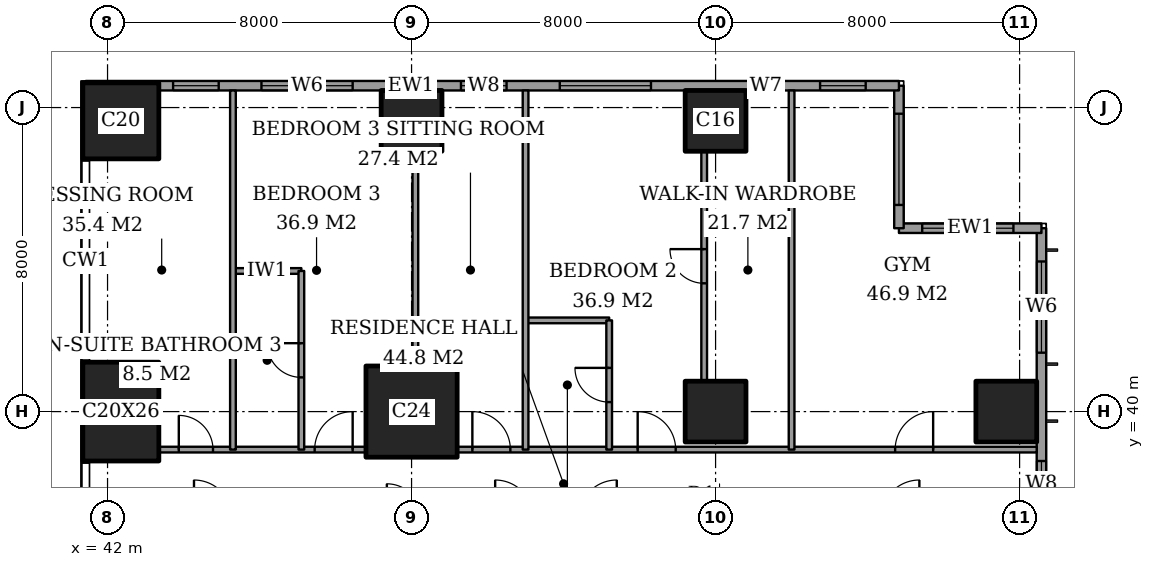
"""IFC4 building model, lengths in metres.
Left out: names, types, materials, properties, quantities, classifications, styles, units other than length and angle.
Written with IfcOpenShell. Run it as: python <this file> out.ifc"""

import sys

from ifc_helpers import new_model, si_unit, direction, frame, frame_2d, origin, origin_2d, place, context, subcontext, project, spatial, rectangle, extrude, element, fill, save


model = new_model("IFC4")
c1 = context("Model", 3, precision=1e-05, world=origin(), true_north=direction((0.0, 1.0)))
c2 = subcontext(c1, "Body", "Model", "MODEL_VIEW")
j1 = project(units=[si_unit("LENGTHUNIT", "METRE"), si_unit("PLANEANGLEUNIT", "RADIAN")], contexts=[c1])
p1 = place(None, origin())
s1 = spatial("IfcSite", under=j1, at=p1, CompositionType="ELEMENT")
p2 = place(p1, origin())
s2 = spatial("IfcBuilding", under=s1, at=p2, CompositionType="ELEMENT")
p3 = place(p2, frame((0.0, 0.0, 266.4)))
s3 = spatial("IfcBuildingStorey", under=s2, at=p3, CompositionType="ELEMENT", Elevation=266.4)
p4 = place(p3, frame((42.35, 40.0, 0.0), z_axis=(0.0, 0.0, 1.0), x_axis=(1.0, 0.0, 0.0)))
e1 = element("IfcColumn", 1, at=p4, inside=s3, PredefinedType="COLUMN", context=c2, shape_type="SweptSolid", body=[
    extrude(rectangle(XDim=2.0, YDim=2.6, at=origin_2d()), origin(), (0.0, 0.0, 1.0), 3.6),
])
p5 = place(p3, frame((42.35, 47.65, 0.0), z_axis=(0.0, 0.0, 1.0), x_axis=(1.0, 0.0, 0.0)))
e2 = element("IfcColumn", 2, at=p5, inside=s3, PredefinedType="COLUMN", context=c2, shape_type="SweptSolid", body=[
    extrude(rectangle(XDim=2.0, YDim=2.0, at=origin_2d()), origin(), (0.0, 0.0, 1.0), 3.6),
])
p6 = place(p3, frame((50.0, 40.0, 0.0), z_axis=(0.0, 0.0, 1.0), x_axis=(1.0, 0.0, 0.0)))
e3 = element("IfcColumn", 3, at=p6, inside=s3, PredefinedType="COLUMN", context=c2, shape_type="SweptSolid", body=[
    extrude(rectangle(XDim=2.4, YDim=2.4, at=origin_2d()), origin(), (0.0, 0.0, 1.0), 3.6),
])
for number, where, z_axis, x_axis in (
    (4, (50.0, 47.65, 0.0), (0.0, 0.0, 1.0), (1.0, 0.0, 0.0)),
    (5, (58.0, 40.0, 0.0), (0.0, 0.0, 1.0), (1.0, 0.0, 0.0)),
    (6, (58.0, 47.65, 0.0), (0.0, 0.0, 1.0), (1.0, 0.0, 0.0)),
    (7, (65.65, 40.0, 0.0), (0.0, 0.0, 1.0), (1.0, 0.0, 0.0)),
):
    element("IfcColumn", number, at=place(p3, frame(where, z_axis=z_axis, x_axis=x_axis)), inside=s3, PredefinedType="COLUMN", context=c2, shape_type="SweptSolid", body=[
        extrude(rectangle(XDim=1.6, YDim=1.6, at=origin_2d()), origin(), (0.0, 0.0, 1.0), 3.6),
    ])
p7 = place(p3, frame((66.575, 3.175, 0.0), z_axis=(0.0, 0.0, 1.0), x_axis=(0.0, 1.0, 0.0)))
e8 = element("IfcWall", 8, at=p7, inside=s3, PredefinedType="SOLIDWALL", context=c2, shape_type="SweptSolid", body=[
    extrude(rectangle(XDim=41.65, YDim=0.25, at=frame_2d((20.825, 0.0))), origin(), (0.0, 0.0, 1.0), 3.6),
])
p8 = place(p7, frame((0.875, 0.0, 0.6)))
e9 = element("IfcOpeningElement", 9, at=p8, cuts=e8, PredefinedType="OPENING", context=c2, shape_type="SweptSolid", body=[
    extrude(rectangle(XDim=2.4, YDim=2.0, at=frame_2d((1.2, 1.0))), frame((0.0, 0.135, 0.0), z_axis=(0.0, -1.0, 0.0), x_axis=(1.0, 0.0, 0.0)), (0.0, 0.0, 1.0), 0.27),
])
p9 = place(p7, frame((6.0, 0.0, 0.6)))
e10 = element("IfcOpeningElement", 10, at=p9, cuts=e8, PredefinedType="OPENING", context=c2, shape_type="SweptSolid", body=[
    extrude(rectangle(XDim=1.2, YDim=2.0, at=frame_2d((0.6, 1.0))), frame((0.0, 0.135, 0.0), z_axis=(0.0, -1.0, 0.0), x_axis=(1.0, 0.0, 0.0)), (0.0, 0.0, 1.0), 0.27),
])
p10 = place(p7, frame((8.525, 0.0, 0.6)))
e11 = element("IfcOpeningElement", 11, at=p10, cuts=e8, PredefinedType="OPENING", context=c2, shape_type="SweptSolid", body=[
    extrude(rectangle(XDim=2.4, YDim=2.0, at=frame_2d((1.2, 1.0))), frame((0.0, 0.135, 0.0), z_axis=(0.0, -1.0, 0.0), x_axis=(1.0, 0.0, 0.0)), (0.0, 0.0, 1.0), 0.27),
])
p11 = place(p7, frame((15.625, 0.0, 0.6)))
e12 = element("IfcOpeningElement", 12, at=p11, cuts=e8, PredefinedType="OPENING", context=c2, shape_type="SweptSolid", body=[
    extrude(rectangle(XDim=2.4, YDim=2.0, at=frame_2d((1.2, 1.0))), frame((0.0, 0.135, 0.0), z_axis=(0.0, -1.0, 0.0), x_axis=(1.0, 0.0, 0.0)), (0.0, 0.0, 1.0), 0.27),
])
p12 = place(p7, frame((23.525, 0.0, 0.6)))
e13 = element("IfcOpeningElement", 13, at=p12, cuts=e8, PredefinedType="OPENING", context=c2, shape_type="SweptSolid", body=[
    extrude(rectangle(XDim=2.4, YDim=2.0, at=frame_2d((1.2, 1.0))), frame((0.0, 0.135, 0.0), z_axis=(0.0, -1.0, 0.0), x_axis=(1.0, 0.0, 0.0)), (0.0, 0.0, 1.0), 0.27),
])
p13 = place(p7, frame((30.625, 0.0, 0.6)))
e14 = element("IfcOpeningElement", 14, at=p13, cuts=e8, PredefinedType="OPENING", context=c2, shape_type="SweptSolid", body=[
    extrude(rectangle(XDim=2.4, YDim=2.0, at=frame_2d((1.2, 1.0))), frame((0.0, 0.135, 0.0), z_axis=(0.0, -1.0, 0.0), x_axis=(1.0, 0.0, 0.0)), (0.0, 0.0, 1.0), 0.27),
])
p14 = place(p7, frame((34.325, 0.0, 0.6)))
e15 = element("IfcOpeningElement", 15, at=p14, cuts=e8, PredefinedType="OPENING", context=c2, shape_type="SweptSolid", body=[
    extrude(rectangle(XDim=1.2, YDim=2.0, at=frame_2d((0.6, 1.0))), frame((0.0, 0.135, 0.0), z_axis=(0.0, -1.0, 0.0), x_axis=(1.0, 0.0, 0.0)), (0.0, 0.0, 1.0), 0.27),
])
p15 = place(p7, frame((38.375, 0.0, 0.6)))
e16 = element("IfcOpeningElement", 16, at=p15, cuts=e8, PredefinedType="OPENING", context=c2, shape_type="SweptSolid", body=[
    extrude(rectangle(XDim=2.4, YDim=2.0, at=frame_2d((1.2, 1.0))), frame((0.0, 0.135, 0.0), z_axis=(0.0, -1.0, 0.0), x_axis=(1.0, 0.0, 0.0)), (0.0, 0.0, 1.0), 0.27),
])
p16 = place(p3, frame((66.575, 44.825, 0.0), z_axis=(0.0, 0.0, 1.0), x_axis=(-1.0, 0.0, 0.0)))
e17 = element("IfcWall", 17, at=p16, inside=s3, PredefinedType="SOLIDWALL", context=c2, shape_type="SweptSolid", body=[
    extrude(rectangle(XDim=3.75, YDim=0.25, at=frame_2d((1.875, 0.0))), origin(), (0.0, 0.0, 1.0), 3.6),
])
p17 = place(p16, frame((0.738, 0.0, 0.6)))
e18 = element("IfcOpeningElement", 18, at=p17, cuts=e17, PredefinedType="OPENING", context=c2, shape_type="SweptSolid", body=[
    extrude(rectangle(XDim=2.4, YDim=2.0, at=frame_2d((1.2, 1.0))), frame((0.0, 0.135, 0.0), z_axis=(0.0, -1.0, 0.0), x_axis=(1.0, 0.0, 0.0)), (0.0, 0.0, 1.0), 0.27),
])
p18 = place(p3, frame((62.825, 44.825, 0.0), z_axis=(0.0, 0.0, 1.0), x_axis=(0.0, 1.0, 0.0)))
e19 = element("IfcWall", 19, at=p18, inside=s3, PredefinedType="SOLIDWALL", context=c2, shape_type="SweptSolid", body=[
    extrude(rectangle(XDim=3.75, YDim=0.25, at=frame_2d((1.875, 0.0))), origin(), (0.0, 0.0, 1.0), 3.6),
])
p19 = place(p18, frame((0.613, 0.0, 0.6)))
e20 = element("IfcOpeningElement", 20, at=p19, cuts=e19, PredefinedType="OPENING", context=c2, shape_type="SweptSolid", body=[
    extrude(rectangle(XDim=2.4, YDim=2.0, at=frame_2d((1.2, 1.0))), frame((0.0, 0.135, 0.0), z_axis=(0.0, -1.0, 0.0), x_axis=(1.0, 0.0, 0.0)), (0.0, 0.0, 1.0), 0.27),
])
p20 = place(p3, frame((62.825, 48.575, 0.0), z_axis=(0.0, 0.0, 1.0), x_axis=(-1.0, 0.0, 0.0)))
e21 = element("IfcWall", 21, at=p20, inside=s3, PredefinedType="SOLIDWALL", context=c2, shape_type="SweptSolid", body=[
    extrude(rectangle(XDim=21.4, YDim=0.25, at=frame_2d((10.7, 0.0))), origin(), (0.0, 0.0, 1.0), 3.6),
])
p21 = place(p20, frame((0.875, 0.0, 0.6)))
e22 = element("IfcOpeningElement", 22, at=p21, cuts=e21, PredefinedType="OPENING", context=c2, shape_type="SweptSolid", body=[
    extrude(rectangle(XDim=1.2, YDim=2.0, at=frame_2d((0.6, 1.0))), frame((0.0, 0.135, 0.0), z_axis=(0.0, -1.0, 0.0), x_axis=(1.0, 0.0, 0.0)), (0.0, 0.0, 1.0), 0.27),
])
p22 = place(p20, frame((3.2, 0.0, 0.6)))
e23 = element("IfcOpeningElement", 23, at=p22, cuts=e21, PredefinedType="OPENING", context=c2, shape_type="SweptSolid", body=[
    extrude(rectangle(XDim=0.6, YDim=2.0, at=frame_2d((0.3, 1.0))), frame((0.0, 0.135, 0.0), z_axis=(0.0, -1.0, 0.0), x_axis=(1.0, 0.0, 0.0)), (0.0, 0.0, 1.0), 0.27),
])
p23 = place(p20, frame((6.525, 0.0, 0.6)))
e24 = element("IfcOpeningElement", 24, at=p23, cuts=e21, PredefinedType="OPENING", context=c2, shape_type="SweptSolid", body=[
    extrude(rectangle(XDim=2.4, YDim=2.0, at=frame_2d((1.2, 1.0))), frame((0.0, 0.135, 0.0), z_axis=(0.0, -1.0, 0.0), x_axis=(1.0, 0.0, 0.0)), (0.0, 0.0, 1.0), 0.27),
])
p24 = place(p20, frame((10.325, 0.0, 0.6)))
e25 = element("IfcOpeningElement", 25, at=p24, cuts=e21, PredefinedType="OPENING", context=c2, shape_type="SweptSolid", body=[
    extrude(rectangle(XDim=1.2, YDim=2.0, at=frame_2d((0.6, 1.0))), frame((0.0, 0.135, 0.0), z_axis=(0.0, -1.0, 0.0), x_axis=(1.0, 0.0, 0.0)), (0.0, 0.0, 1.0), 0.27),
])
p25 = place(p20, frame((14.375, 0.0, 0.6)))
e26 = element("IfcOpeningElement", 26, at=p25, cuts=e21, PredefinedType="OPENING", context=c2, shape_type="SweptSolid", body=[
    extrude(rectangle(XDim=2.4, YDim=2.0, at=frame_2d((1.2, 1.0))), frame((0.0, 0.135, 0.0), z_axis=(0.0, -1.0, 0.0), x_axis=(1.0, 0.0, 0.0)), (0.0, 0.0, 1.0), 0.27),
])
p26 = place(p20, frame((17.9, 0.0, 0.6)))
e27 = element("IfcOpeningElement", 27, at=p26, cuts=e21, PredefinedType="OPENING", context=c2, shape_type="SweptSolid", body=[
    extrude(rectangle(XDim=1.2, YDim=2.0, at=frame_2d((0.6, 1.0))), frame((0.0, 0.135, 0.0), z_axis=(0.0, -1.0, 0.0), x_axis=(1.0, 0.0, 0.0)), (0.0, 0.0, 1.0), 0.27),
])
p27 = place(p3, frame((43.35, 39.0, 0.0), z_axis=(0.0, 0.0, 1.0), x_axis=(1.0, 0.0, 0.0)))
e28 = element("IfcWall", 28, at=p27, inside=s3, PredefinedType="PARTITIONING", context=c2, shape_type="SweptSolid", body=[
    extrude(rectangle(XDim=5.45, YDim=0.15, at=frame_2d((2.725, 0.0))), origin(), (0.0, 0.0, 1.0), 3.35),
])
p28 = place(p27, frame((4.1, 0.0, 0.0)))
e29 = element("IfcOpeningElement", 29, at=p28, cuts=e28, PredefinedType="OPENING", context=c2, shape_type="SweptSolid", body=[
    extrude(rectangle(XDim=1.0, YDim=2.1, at=frame_2d((0.5, 1.05))), frame((0.0, 0.085, 0.0), z_axis=(0.0, -1.0, 0.0), x_axis=(1.0, 0.0, 0.0)), (0.0, 0.0, 1.0), 0.17),
])
p29 = place(p27, frame((0.525, 0.0, 0.0)))
e30 = element("IfcOpeningElement", 30, at=p29, cuts=e28, PredefinedType="OPENING", context=c2, shape_type="SweptSolid", body=[
    extrude(rectangle(XDim=0.9, YDim=2.1, at=frame_2d((0.45, 1.05))), frame((0.0, 0.085, 0.0), z_axis=(0.0, -1.0, 0.0), x_axis=(1.0, 0.0, 0.0)), (0.0, 0.0, 1.0), 0.17),
])
p30 = place(p3, frame((51.2, 39.0, 0.0), z_axis=(0.0, 0.0, 1.0), x_axis=(1.0, 0.0, 0.0)))
e31 = element("IfcWall", 31, at=p30, inside=s3, PredefinedType="PARTITIONING", context=c2, shape_type="SweptSolid", body=[
    extrude(rectangle(XDim=15.25, YDim=0.15, at=frame_2d((7.625, 0.0))), origin(), (0.0, 0.0, 1.0), 3.35),
])
p31 = place(p30, frame((11.525, 0.0, 0.0)))
e32 = element("IfcOpeningElement", 32, at=p31, cuts=e31, PredefinedType="OPENING", context=c2, shape_type="SweptSolid", body=[
    extrude(rectangle(XDim=1.0, YDim=2.1, at=frame_2d((0.5, 1.05))), frame((0.0, 0.085, 0.0), z_axis=(0.0, -1.0, 0.0), x_axis=(1.0, 0.0, 0.0)), (0.0, 0.0, 1.0), 0.17),
])
p32 = place(p30, frame((4.75, 0.0, 0.0)))
e33 = element("IfcOpeningElement", 33, at=p32, cuts=e31, PredefinedType="OPENING", context=c2, shape_type="SweptSolid", body=[
    extrude(rectangle(XDim=1.0, YDim=2.1, at=frame_2d((0.5, 1.05))), frame((0.0, 0.085, 0.0), z_axis=(0.0, -1.0, 0.0), x_axis=(1.0, 0.0, 0.0)), (0.0, 0.0, 1.0), 0.17),
])
p33 = place(p30, frame((0.4, 0.0, 0.0)))
e34 = element("IfcOpeningElement", 34, at=p33, cuts=e31, PredefinedType="OPENING", context=c2, shape_type="SweptSolid", body=[
    extrude(rectangle(XDim=1.0, YDim=2.1, at=frame_2d((0.5, 1.05))), frame((0.0, 0.085, 0.0), z_axis=(0.0, -1.0, 0.0), x_axis=(1.0, 0.0, 0.0)), (0.0, 0.0, 1.0), 0.17),
])
p34 = place(p3, frame((53.0, 42.4, 0.0), z_axis=(0.0, 0.0, 1.0), x_axis=(1.0, 0.0, 0.0)))
e35 = element("IfcWall", 35, at=p34, inside=s3, PredefinedType="PARTITIONING", context=c2, shape_type="SweptSolid", body=[
    extrude(rectangle(XDim=2.2, YDim=0.15, at=frame_2d((1.1, 0.0))), origin(), (0.0, 0.0, 1.0), 3.35),
])
p35 = place(p3, frame((45.3, 43.7, 0.0), z_axis=(0.0, 0.0, 1.0), x_axis=(1.0, 0.0, 0.0)))
e36 = element("IfcWall", 36, at=p35, inside=s3, PredefinedType="PARTITIONING", context=c2, shape_type="SweptSolid", body=[
    extrude(rectangle(XDim=1.8, YDim=0.15, at=frame_2d((0.9, 0.0))), origin(), (0.0, 0.0, 1.0), 3.35),
])
p36 = place(p3, frame((45.3, 39.0, 0.0), z_axis=(0.0, 0.0, 1.0), x_axis=(0.0, 1.0, 0.0)))
e37 = element("IfcWall", 37, at=p36, inside=s3, PredefinedType="PARTITIONING", context=c2, shape_type="SweptSolid", body=[
    extrude(rectangle(XDim=9.45, YDim=0.15, at=frame_2d((4.725, 0.0))), origin(), (0.0, 0.0, 1.0), 3.35),
])
p37 = place(p3, frame((47.1, 39.0, 0.0), z_axis=(0.0, 0.0, 1.0), x_axis=(0.0, 1.0, 0.0)))
e38 = element("IfcWall", 38, at=p37, inside=s3, PredefinedType="PARTITIONING", context=c2, shape_type="SweptSolid", body=[
    extrude(rectangle(XDim=4.7, YDim=0.15, at=frame_2d((2.35, 0.0))), origin(), (0.0, 0.0, 1.0), 3.35),
])
p38 = place(p37, frame((1.9, 0.0, 0.0)))
e39 = element("IfcOpeningElement", 39, at=p38, cuts=e38, PredefinedType="OPENING", context=c2, shape_type="SweptSolid", body=[
    extrude(rectangle(XDim=0.9, YDim=2.1, at=frame_2d((0.45, 1.05))), frame((0.0, 0.085, 0.0), z_axis=(0.0, -1.0, 0.0), x_axis=(1.0, 0.0, 0.0)), (0.0, 0.0, 1.0), 0.17),
])
p39 = place(p3, frame((50.1, 41.2, 0.0), z_axis=(0.0, 0.0, 1.0), x_axis=(0.0, 1.0, 0.0)))
e40 = element("IfcWall", 40, at=p39, inside=s3, PredefinedType="PARTITIONING", context=c2, shape_type="SweptSolid", body=[
    extrude(rectangle(XDim=5.65, YDim=0.15, at=frame_2d((2.825, 0.0))), origin(), (0.0, 0.0, 1.0), 3.35),
])
p40 = place(p3, frame((53.0, 39.0, 0.0), z_axis=(0.0, 0.0, 1.0), x_axis=(0.0, 1.0, 0.0)))
e41 = element("IfcWall", 41, at=p40, inside=s3, PredefinedType="PARTITIONING", context=c2, shape_type="SweptSolid", body=[
    extrude(rectangle(XDim=9.45, YDim=0.15, at=frame_2d((4.725, 0.0))), origin(), (0.0, 0.0, 1.0), 3.35),
])
p41 = place(p3, frame((55.2, 39.0, 0.0), z_axis=(0.0, 0.0, 1.0), x_axis=(0.0, 1.0, 0.0)))
e42 = element("IfcWall", 42, at=p41, inside=s3, PredefinedType="PARTITIONING", context=c2, shape_type="SweptSolid", body=[
    extrude(rectangle(XDim=3.4, YDim=0.15, at=frame_2d((1.7, 0.0))), origin(), (0.0, 0.0, 1.0), 3.35),
])
p42 = place(p41, frame((1.25, 0.0, 0.0)))
e43 = element("IfcOpeningElement", 43, at=p42, cuts=e42, PredefinedType="OPENING", context=c2, shape_type="SweptSolid", body=[
    extrude(rectangle(XDim=0.9, YDim=2.1, at=frame_2d((0.45, 1.05))), frame((0.0, 0.085, 0.0), z_axis=(0.0, -1.0, 0.0), x_axis=(1.0, 0.0, 0.0)), (0.0, 0.0, 1.0), 0.17),
])
p43 = place(p3, frame((57.7, 40.8, 0.0), z_axis=(0.0, 0.0, 1.0), x_axis=(0.0, 1.0, 0.0)))
e44 = element("IfcWall", 44, at=p43, inside=s3, PredefinedType="PARTITIONING", context=c2, shape_type="SweptSolid", body=[
    extrude(rectangle(XDim=6.05, YDim=0.15, at=frame_2d((3.025, 0.0))), origin(), (0.0, 0.0, 1.0), 3.35),
])
p44 = place(p43, frame((2.575, 0.0, 0.0)))
e45 = element("IfcOpeningElement", 45, at=p44, cuts=e44, PredefinedType="OPENING", context=c2, shape_type="SweptSolid", body=[
    extrude(rectangle(XDim=0.9, YDim=2.1, at=frame_2d((0.45, 1.05))), frame((0.0, 0.085, 0.0), z_axis=(0.0, -1.0, 0.0), x_axis=(1.0, 0.0, 0.0)), (0.0, 0.0, 1.0), 0.17),
])
p45 = place(p3, frame((60.0, 39.0, 0.0), z_axis=(0.0, 0.0, 1.0), x_axis=(0.0, 1.0, 0.0)))
e46 = element("IfcWall", 46, at=p45, inside=s3, PredefinedType="PARTITIONING", context=c2, shape_type="SweptSolid", body=[
    extrude(rectangle(XDim=9.45, YDim=0.15, at=frame_2d((4.725, 0.0))), origin(), (0.0, 0.0, 1.0), 3.35),
])
p46 = place(p14, origin())
e47 = element("IfcWindow", 47, at=p46, inside=s3, PartitioningType="SINGLE_PANEL", PredefinedType="WINDOW", context=c2, shape_type="SweptSolid", body=[
    extrude(rectangle(XDim=1.2, YDim=2.0, at=frame_2d((0.6, 1.0))), frame((0.0, 0.03, 0.0), z_axis=(0.0, -1.0, 0.0), x_axis=(1.0, 0.0, 0.0)), (0.0, 0.0, 1.0), 0.06),
])
fill(e15, e47)
p47 = place(p15, origin())
e48 = element("IfcWindow", 48, at=p47, inside=s3, PartitioningType="SINGLE_PANEL", PredefinedType="WINDOW", context=c2, shape_type="SweptSolid", body=[
    extrude(rectangle(XDim=2.4, YDim=2.0, at=frame_2d((1.2, 1.0))), frame((0.0, 0.03, 0.0), z_axis=(0.0, -1.0, 0.0), x_axis=(1.0, 0.0, 0.0)), (0.0, 0.0, 1.0), 0.06),
])
fill(e16, e48)
p48 = place(p17, origin())
e49 = element("IfcWindow", 49, at=p48, inside=s3, PartitioningType="SINGLE_PANEL", PredefinedType="WINDOW", context=c2, shape_type="SweptSolid", body=[
    extrude(rectangle(XDim=2.4, YDim=2.0, at=frame_2d((1.2, 1.0))), frame((0.0, 0.03, 0.0), z_axis=(0.0, -1.0, 0.0), x_axis=(1.0, 0.0, 0.0)), (0.0, 0.0, 1.0), 0.06),
])
fill(e18, e49)
p49 = place(p19, origin())
e50 = element("IfcWindow", 50, at=p49, inside=s3, PartitioningType="SINGLE_PANEL", PredefinedType="WINDOW", context=c2, shape_type="SweptSolid", body=[
    extrude(rectangle(XDim=2.4, YDim=2.0, at=frame_2d((1.2, 1.0))), frame((0.0, 0.03, 0.0), z_axis=(0.0, -1.0, 0.0), x_axis=(1.0, 0.0, 0.0)), (0.0, 0.0, 1.0), 0.06),
])
fill(e20, e50)
p50 = place(p21, origin())
e51 = element("IfcWindow", 51, at=p50, inside=s3, PartitioningType="SINGLE_PANEL", PredefinedType="WINDOW", context=c2, shape_type="SweptSolid", body=[
    extrude(rectangle(XDim=1.2, YDim=2.0, at=frame_2d((0.6, 1.0))), frame((0.0, 0.03, 0.0), z_axis=(0.0, -1.0, 0.0), x_axis=(1.0, 0.0, 0.0)), (0.0, 0.0, 1.0), 0.06),
])
fill(e22, e51)
p51 = place(p22, origin())
e52 = element("IfcWindow", 52, at=p51, inside=s3, PartitioningType="SINGLE_PANEL", PredefinedType="WINDOW", context=c2, shape_type="SweptSolid", body=[
    extrude(rectangle(XDim=0.6, YDim=2.0, at=frame_2d((0.3, 1.0))), frame((0.0, 0.03, 0.0), z_axis=(0.0, -1.0, 0.0), x_axis=(1.0, 0.0, 0.0)), (0.0, 0.0, 1.0), 0.06),
])
fill(e23, e52)
p52 = place(p23, origin())
e53 = element("IfcWindow", 53, at=p52, inside=s3, PartitioningType="SINGLE_PANEL", PredefinedType="WINDOW", context=c2, shape_type="SweptSolid", body=[
    extrude(rectangle(XDim=2.4, YDim=2.0, at=frame_2d((1.2, 1.0))), frame((0.0, 0.03, 0.0), z_axis=(0.0, -1.0, 0.0), x_axis=(1.0, 0.0, 0.0)), (0.0, 0.0, 1.0), 0.06),
])
fill(e24, e53)
p53 = place(p24, origin())
e54 = element("IfcWindow", 54, at=p53, inside=s3, PartitioningType="SINGLE_PANEL", PredefinedType="WINDOW", context=c2, shape_type="SweptSolid", body=[
    extrude(rectangle(XDim=1.2, YDim=2.0, at=frame_2d((0.6, 1.0))), frame((0.0, 0.03, 0.0), z_axis=(0.0, -1.0, 0.0), x_axis=(1.0, 0.0, 0.0)), (0.0, 0.0, 1.0), 0.06),
])
fill(e25, e54)
p54 = place(p25, origin())
e55 = element("IfcWindow", 55, at=p54, inside=s3, PartitioningType="SINGLE_PANEL", PredefinedType="WINDOW", context=c2, shape_type="SweptSolid", body=[
    extrude(rectangle(XDim=2.4, YDim=2.0, at=frame_2d((1.2, 1.0))), frame((0.0, 0.03, 0.0), z_axis=(0.0, -1.0, 0.0), x_axis=(1.0, 0.0, 0.0)), (0.0, 0.0, 1.0), 0.06),
])
fill(e26, e55)
p55 = place(p26, origin())
e56 = element("IfcWindow", 56, at=p55, inside=s3, PartitioningType="SINGLE_PANEL", PredefinedType="WINDOW", context=c2, shape_type="SweptSolid", body=[
    extrude(rectangle(XDim=1.2, YDim=2.0, at=frame_2d((0.6, 1.0))), frame((0.0, 0.03, 0.0), z_axis=(0.0, -1.0, 0.0), x_axis=(1.0, 0.0, 0.0)), (0.0, 0.0, 1.0), 0.06),
])
fill(e27, e56)
p56 = place(p31, origin())
e57 = element("IfcDoor", 57, at=p56, inside=s3, OperationType="SINGLE_SWING_LEFT", PredefinedType="DOOR", context=c2, shape_type="SweptSolid", body=[
    extrude(rectangle(XDim=1.0, YDim=2.1, at=frame_2d((0.5, 1.05))), frame((0.0, 0.025, 0.0), z_axis=(0.0, -1.0, 0.0), x_axis=(1.0, 0.0, 0.0)), (0.0, 0.0, 1.0), 0.05),
])
fill(e32, e57)
p57 = place(p44, origin())
e58 = element("IfcDoor", 58, at=p57, inside=s3, OperationType="SINGLE_SWING_LEFT", PredefinedType="DOOR", context=c2, shape_type="SweptSolid", body=[
    extrude(rectangle(XDim=0.9, YDim=2.1, at=frame_2d((0.45, 1.05))), frame((0.0, 0.025, 0.0), z_axis=(0.0, -1.0, 0.0), x_axis=(1.0, 0.0, 0.0)), (0.0, 0.0, 1.0), 0.05),
])
fill(e45, e58)
p58 = place(p42, origin())
e59 = element("IfcDoor", 59, at=p58, inside=s3, OperationType="SINGLE_SWING_LEFT", PredefinedType="DOOR", context=c2, shape_type="SweptSolid", body=[
    extrude(rectangle(XDim=0.9, YDim=2.1, at=frame_2d((0.45, 1.05))), frame((0.0, 0.025, 0.0), z_axis=(0.0, -1.0, 0.0), x_axis=(1.0, 0.0, 0.0)), (0.0, 0.0, 1.0), 0.05),
])
fill(e43, e59)
p59 = place(p32, origin())
e60 = element("IfcDoor", 60, at=p59, inside=s3, OperationType="SINGLE_SWING_RIGHT", PredefinedType="DOOR", context=c2, shape_type="SweptSolid", body=[
    extrude(rectangle(XDim=1.0, YDim=2.1, at=frame_2d((0.5, 1.05))), frame((0.0, 0.025, 0.0), z_axis=(0.0, -1.0, 0.0), x_axis=(1.0, 0.0, 0.0)), (0.0, 0.0, 1.0), 0.05),
])
fill(e33, e60)
p60 = place(p33, origin())
e61 = element("IfcDoor", 61, at=p60, inside=s3, OperationType="SINGLE_SWING_RIGHT", PredefinedType="DOOR", context=c2, shape_type="SweptSolid", body=[
    extrude(rectangle(XDim=1.0, YDim=2.1, at=frame_2d((0.5, 1.05))), frame((0.0, 0.025, 0.0), z_axis=(0.0, -1.0, 0.0), x_axis=(1.0, 0.0, 0.0)), (0.0, 0.0, 1.0), 0.05),
])
fill(e34, e61)
p61 = place(p38, origin())
e62 = element("IfcDoor", 62, at=p61, inside=s3, OperationType="SINGLE_SWING_LEFT", PredefinedType="DOOR", context=c2, shape_type="SweptSolid", body=[
    extrude(rectangle(XDim=0.9, YDim=2.1, at=frame_2d((0.45, 1.05))), frame((0.0, 0.025, 0.0), z_axis=(0.0, -1.0, 0.0), x_axis=(1.0, 0.0, 0.0)), (0.0, 0.0, 1.0), 0.05),
])
fill(e39, e62)
p62 = place(p28, origin())
e63 = element("IfcDoor", 63, at=p62, inside=s3, OperationType="SINGLE_SWING_LEFT", PredefinedType="DOOR", context=c2, shape_type="SweptSolid", body=[
    extrude(rectangle(XDim=1.0, YDim=2.1, at=frame_2d((0.5, 1.05))), frame((0.0, 0.025, 0.0), z_axis=(0.0, -1.0, 0.0), x_axis=(1.0, 0.0, 0.0)), (0.0, 0.0, 1.0), 0.05),
])
fill(e29, e63)
p63 = place(p29, origin())
e64 = element("IfcDoor", 64, at=p63, inside=s3, OperationType="SINGLE_SWING_RIGHT", PredefinedType="DOOR", context=c2, shape_type="SweptSolid", body=[
    extrude(rectangle(XDim=0.9, YDim=2.1, at=frame_2d((0.45, 1.05))), frame((0.0, 0.025, 0.0), z_axis=(0.0, -1.0, 0.0), x_axis=(1.0, 0.0, 0.0)), (0.0, 0.0, 1.0), 0.05),
])
fill(e30, e64)
save(model, sys.argv[1])
